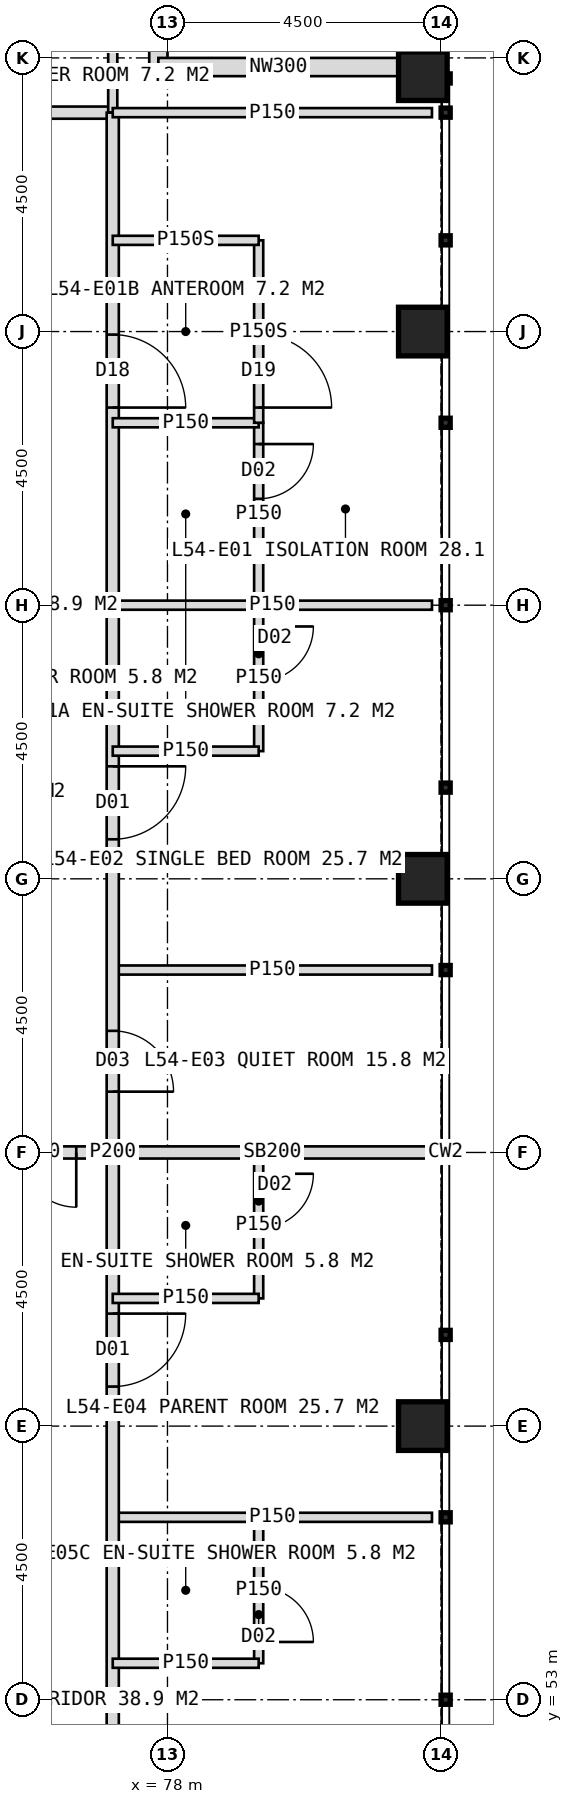
"""IFC4 building model, lengths in metres.
Left out: names, types, materials, properties, quantities, classifications, styles, units other than length and angle.
Written with IfcOpenShell. Run it as: python <this file> out.ifc"""

import sys

from ifc_helpers import new_model, si_unit, direction, frame, frame_2d, origin, origin_2d, place, context, subcontext, project, spatial, rectangle, hollow_rectangle, extrude, element, fill, save


model = new_model("IFC4")
c1 = context("Model", 3, precision=1e-05, world=origin(), true_north=direction((0.0, 1.0)))
c2 = subcontext(c1, "Body", "Model", "MODEL_VIEW")
j1 = project(units=[si_unit("LENGTHUNIT", "METRE"), si_unit("PLANEANGLEUNIT", "RADIAN")], contexts=[c1])
p1 = place(None, origin())
s1 = spatial("IfcSite", under=j1, at=p1, CompositionType="ELEMENT")
p2 = place(p1, origin())
s2 = spatial("IfcBuilding", under=s1, at=p2, CompositionType="ELEMENT")
p3 = place(p2, frame((0.0, 0.0, 225.0)))
s3 = spatial("IfcBuildingStorey", under=s2, at=p3, CompositionType="ELEMENT", Elevation=225.0)
for number, where, z_axis, x_axis in (
    (1, (82.2, 57.5, 0.0), (0.0, 0.0, 1.0), (1.0, 0.0, 0.0)),
    (2, (82.2, 66.5, 0.0), (0.0, 0.0, 1.0), (1.0, 0.0, 0.0)),
    (3, (82.2, 75.5, 0.0), (0.0, 0.0, 1.0), (1.0, 0.0, 0.0)),
    (4, (82.2, 79.7, 0.0), (0.0, 0.0, 1.0), (1.0, 0.0, 0.0)),
):
    element("IfcColumn", number, at=place(p3, frame(where, z_axis=z_axis, x_axis=x_axis)), inside=s3, PredefinedType="COLUMN", context=c2, shape_type="SweptSolid", body=[
        extrude(hollow_rectangle(XDim=0.8, YDim=0.8, WallThickness=0.08, at=origin_2d()), origin(), (0.0, 0.0, 1.0), 4.0),
    ])
for number, where, z_axis, x_axis in (
    (5, (77.85, 83.8, 0.0), (0.0, 0.0, 1.0), (0.0, -1.0, 0.0)),
    (6, (77.85, 79.85, 0.0), (0.0, 0.0, 1.0), (1.0, 0.0, 0.0)),
):
    element("IfcWall", number, at=place(p3, frame(where, z_axis=z_axis, x_axis=x_axis)), inside=s3, PredefinedType="ELEMENTEDWALL", context=c2, shape_type="SweptSolid", body=[
        extrude(rectangle(XDim=3.95, YDim=0.3, at=frame_2d((1.975, 0.0))), origin(), (0.0, 0.0, 1.0), 2.85),
    ])
p4 = place(p3, frame((42.9, 79.1, 0.0), z_axis=(0.0, 0.0, 1.0), x_axis=(1.0, 0.0, 0.0)))
e7 = element("IfcWall", 7, at=p4, inside=s3, PredefinedType="PARTITIONING", context=c2, shape_type="SweptSolid", body=[
    extrude(rectangle(XDim=34.2, YDim=0.2, at=frame_2d((17.1, 0.0))), origin(), (0.0, 0.0, 1.0), 3.75),
])
p5 = place(p4, frame((3.55, 0.0, 0.0)))
e8 = element("IfcOpeningElement", 8, at=p5, cuts=e7, PredefinedType="OPENING", context=c2, shape_type="SweptSolid", body=[
    extrude(rectangle(XDim=1.0, YDim=2.1, at=frame_2d((0.5, 1.05))), frame((0.0, 0.11, 0.0), z_axis=(0.0, -1.0, 0.0), x_axis=(1.0, 0.0, 0.0)), (0.0, 0.0, 1.0), 0.22),
])
p6 = place(p4, frame((10.75, 0.0, 0.0)))
e9 = element("IfcOpeningElement", 9, at=p6, cuts=e7, PredefinedType="OPENING", context=c2, shape_type="SweptSolid", body=[
    extrude(rectangle(XDim=1.2, YDim=2.2, at=frame_2d((0.6, 1.1))), frame((0.0, 0.11, 0.0), z_axis=(0.0, -1.0, 0.0), x_axis=(1.0, 0.0, 0.0)), (0.0, 0.0, 1.0), 0.22),
])
p7 = place(p4, frame((16.25, 0.0, 0.0)))
e10 = element("IfcOpeningElement", 10, at=p7, cuts=e7, PredefinedType="OPENING", context=c2, shape_type="SweptSolid", body=[
    extrude(rectangle(XDim=1.2, YDim=2.2, at=frame_2d((0.6, 1.1))), frame((0.0, 0.11, 0.0), z_axis=(0.0, -1.0, 0.0), x_axis=(1.0, 0.0, 0.0)), (0.0, 0.0, 1.0), 0.22),
])
p8 = place(p4, frame((22.75, 0.0, 0.0)))
e11 = element("IfcOpeningElement", 11, at=p8, cuts=e7, PredefinedType="OPENING", context=c2, shape_type="SweptSolid", body=[
    extrude(rectangle(XDim=1.2, YDim=2.2, at=frame_2d((0.6, 1.1))), frame((0.0, 0.11, 0.0), z_axis=(0.0, -1.0, 0.0), x_axis=(1.0, 0.0, 0.0)), (0.0, 0.0, 1.0), 0.22),
])
p9 = place(p4, frame((29.75, 0.0, 0.0)))
e12 = element("IfcOpeningElement", 12, at=p9, cuts=e7, PredefinedType="OPENING", context=c2, shape_type="SweptSolid", body=[
    extrude(rectangle(XDim=1.2, YDim=2.2, at=frame_2d((0.6, 1.1))), frame((0.0, 0.11, 0.0), z_axis=(0.0, -1.0, 0.0), x_axis=(1.0, 0.0, 0.0)), (0.0, 0.0, 1.0), 0.22),
])
p10 = place(p3, frame((77.1, 79.1, 0.0), z_axis=(0.0, 0.0, 1.0), x_axis=(0.0, 1.0, 0.0)))
e13 = element("IfcWall", 13, at=p10, inside=s3, PredefinedType="PARTITIONING", context=c2, shape_type="SweptSolid", body=[
    extrude(rectangle(XDim=2.4, YDim=0.15, at=frame_2d((1.2, 0.0))), origin(), (0.0, 0.0, 1.0), 3.75),
])
for number, where, z_axis, x_axis in (
    (14, (77.1, 71.0, 0.0), (0.0, 0.0, 1.0), (1.0, 0.0, 0.0)),
    (15, (77.1, 65.0, 0.0), (0.0, 0.0, 1.0), (1.0, 0.0, 0.0)),
):
    element("IfcWall", number, at=place(p3, frame(where, z_axis=z_axis, x_axis=x_axis)), inside=s3, PredefinedType="PARTITIONING", context=c2, shape_type="SweptSolid", body=[
        extrude(rectangle(XDim=5.25, YDim=0.15, at=frame_2d((2.625, 0.0))), origin(), (0.0, 0.0, 1.0), 3.75),
    ])
p11 = place(p3, frame((77.1, 62.0, 0.0), z_axis=(0.0, 0.0, 1.0), x_axis=(1.0, 0.0, 0.0)))
e16 = element("IfcWall", 16, at=p11, inside=s3, PredefinedType="SOLIDWALL", context=c2, shape_type="SweptSolid", body=[
    extrude(rectangle(XDim=5.25, YDim=0.2, at=frame_2d((2.625, 0.0))), origin(), (0.0, 0.0, 1.0), 2.95),
])
p12 = place(p3, frame((77.1, 56.0, 0.0), z_axis=(0.0, 0.0, 1.0), x_axis=(1.0, 0.0, 0.0)))
e17 = element("IfcWall", 17, at=p12, inside=s3, PredefinedType="PARTITIONING", context=c2, shape_type="SweptSolid", body=[
    extrude(rectangle(XDim=5.25, YDim=0.15, at=frame_2d((2.625, 0.0))), origin(), (0.0, 0.0, 1.0), 3.75),
])
p13 = place(p3, frame((77.1, 79.1, 0.0), z_axis=(0.0, 0.0, 1.0), x_axis=(0.0, -1.0, 0.0)))
e18 = element("IfcWall", 18, at=p13, inside=s3, PredefinedType="PARTITIONING", context=c2, shape_type="SweptSolid", body=[
    extrude(rectangle(XDim=34.2, YDim=0.2, at=frame_2d((17.1, 0.0))), origin(), (0.0, 0.0, 1.0), 3.75),
])
p14 = place(p13, frame((3.65, 0.0, 0.0)))
e19 = element("IfcOpeningElement", 19, at=p14, cuts=e18, PredefinedType="OPENING", context=c2, shape_type="SweptSolid", body=[
    extrude(rectangle(XDim=1.2, YDim=2.2, at=frame_2d((0.6, 1.1))), frame((0.0, 0.11, 0.0), z_axis=(0.0, -1.0, 0.0), x_axis=(1.0, 0.0, 0.0)), (0.0, 0.0, 1.0), 0.22),
])
p15 = place(p13, frame((10.75, 0.0, 0.0)))
e20 = element("IfcOpeningElement", 20, at=p15, cuts=e18, PredefinedType="OPENING", context=c2, shape_type="SweptSolid", body=[
    extrude(rectangle(XDim=1.2, YDim=2.2, at=frame_2d((0.6, 1.1))), frame((0.0, 0.11, 0.0), z_axis=(0.0, -1.0, 0.0), x_axis=(1.0, 0.0, 0.0)), (0.0, 0.0, 1.0), 0.22),
])
p16 = place(p13, frame((15.1, 0.0, 0.0)))
e21 = element("IfcOpeningElement", 21, at=p16, cuts=e18, PredefinedType="OPENING", context=c2, shape_type="SweptSolid", body=[
    extrude(rectangle(XDim=1.0, YDim=2.1, at=frame_2d((0.5, 1.05))), frame((0.0, 0.11, 0.0), z_axis=(0.0, -1.0, 0.0), x_axis=(1.0, 0.0, 0.0)), (0.0, 0.0, 1.0), 0.22),
])
p17 = place(p13, frame((19.75, 0.0, 0.0)))
e22 = element("IfcOpeningElement", 22, at=p17, cuts=e18, PredefinedType="OPENING", context=c2, shape_type="SweptSolid", body=[
    extrude(rectangle(XDim=1.2, YDim=2.2, at=frame_2d((0.6, 1.1))), frame((0.0, 0.11, 0.0), z_axis=(0.0, -1.0, 0.0), x_axis=(1.0, 0.0, 0.0)), (0.0, 0.0, 1.0), 0.22),
])
p18 = place(p13, frame((30.35, 0.0, 0.0)))
e23 = element("IfcOpeningElement", 23, at=p18, cuts=e18, PredefinedType="OPENING", context=c2, shape_type="SweptSolid", body=[
    extrude(rectangle(XDim=1.2, YDim=2.2, at=frame_2d((0.6, 1.1))), frame((0.0, 0.11, 0.0), z_axis=(0.0, -1.0, 0.0), x_axis=(1.0, 0.0, 0.0)), (0.0, 0.0, 1.0), 0.22),
])
p19 = place(p3, frame((77.1, 79.1, 0.0), z_axis=(0.0, 0.0, 1.0), x_axis=(1.0, 0.0, 0.0)))
e24 = element("IfcWall", 24, at=p19, inside=s3, PredefinedType="PARTITIONING", context=c2, shape_type="SweptSolid", body=[
    extrude(rectangle(XDim=5.25, YDim=0.15, at=frame_2d((2.625, 0.0))), origin(), (0.0, 0.0, 1.0), 3.75),
])
p20 = place(p3, frame((79.5, 74.0, 0.0), z_axis=(0.0, 0.0, 1.0), x_axis=(0.0, -1.0, 0.0)))
e25 = element("IfcWall", 25, at=p20, inside=s3, PredefinedType="PARTITIONING", context=c2, shape_type="SweptSolid", body=[
    extrude(rectangle(XDim=3.0, YDim=0.15, at=frame_2d((1.5, 0.0))), origin(), (0.0, 0.0, 1.0), 3.75),
])
p21 = place(p20, frame((0.35, 0.0, 0.0)))
e26 = element("IfcOpeningElement", 26, at=p21, cuts=e25, PredefinedType="OPENING", context=c2, shape_type="SweptSolid", body=[
    extrude(rectangle(XDim=0.9, YDim=2.1, at=frame_2d((0.45, 1.05))), frame((0.0, 0.085, 0.0), z_axis=(0.0, -1.0, 0.0), x_axis=(1.0, 0.0, 0.0)), (0.0, 0.0, 1.0), 0.17),
])
p22 = place(p3, frame((77.1, 74.0, 0.0), z_axis=(0.0, 0.0, 1.0), x_axis=(1.0, 0.0, 0.0)))
e27 = element("IfcWall", 27, at=p22, inside=s3, PredefinedType="PARTITIONING", context=c2, shape_type="SweptSolid", body=[
    extrude(rectangle(XDim=2.4, YDim=0.15, at=frame_2d((1.2, 0.0))), origin(), (0.0, 0.0, 1.0), 3.75),
])
p23 = place(p3, frame((79.5, 77.0, 0.0), z_axis=(0.0, 0.0, 1.0), x_axis=(0.0, -1.0, 0.0)))
e28 = element("IfcWall", 28, at=p23, inside=s3, PredefinedType="PARTITIONING", context=c2, shape_type="SweptSolid", body=[
    extrude(rectangle(XDim=3.0, YDim=0.15, at=frame_2d((1.5, 0.0))), origin(), (0.0, 0.0, 1.0), 3.75),
])
p24 = place(p23, frame((1.55, 0.0, 0.0)))
e29 = element("IfcOpeningElement", 29, at=p24, cuts=e28, PredefinedType="OPENING", context=c2, shape_type="SweptSolid", body=[
    extrude(rectangle(XDim=1.2, YDim=2.2, at=frame_2d((0.6, 1.1))), frame((0.0, 0.085, 0.0), z_axis=(0.0, -1.0, 0.0), x_axis=(1.0, 0.0, 0.0)), (0.0, 0.0, 1.0), 0.17),
])
p25 = place(p3, frame((77.1, 77.0, 0.0), z_axis=(0.0, 0.0, 1.0), x_axis=(1.0, 0.0, 0.0)))
e30 = element("IfcWall", 30, at=p25, inside=s3, PredefinedType="PARTITIONING", context=c2, shape_type="SweptSolid", body=[
    extrude(rectangle(XDim=2.4, YDim=0.15, at=frame_2d((1.2, 0.0))), origin(), (0.0, 0.0, 1.0), 3.75),
])
p26 = place(p3, frame((79.5, 71.0, 0.0), z_axis=(0.0, 0.0, 1.0), x_axis=(0.0, -1.0, 0.0)))
e31 = element("IfcWall", 31, at=p26, inside=s3, PredefinedType="PARTITIONING", context=c2, shape_type="SweptSolid", body=[
    extrude(rectangle(XDim=2.4, YDim=0.15, at=frame_2d((1.2, 0.0))), origin(), (0.0, 0.0, 1.0), 3.75),
])
p27 = place(p26, frame((0.35, 0.0, 0.0)))
e32 = element("IfcOpeningElement", 32, at=p27, cuts=e31, PredefinedType="OPENING", context=c2, shape_type="SweptSolid", body=[
    extrude(rectangle(XDim=0.9, YDim=2.1, at=frame_2d((0.45, 1.05))), frame((0.0, 0.085, 0.0), z_axis=(0.0, -1.0, 0.0), x_axis=(1.0, 0.0, 0.0)), (0.0, 0.0, 1.0), 0.17),
])
p28 = place(p3, frame((77.1, 68.6, 0.0), z_axis=(0.0, 0.0, 1.0), x_axis=(1.0, 0.0, 0.0)))
e33 = element("IfcWall", 33, at=p28, inside=s3, PredefinedType="PARTITIONING", context=c2, shape_type="SweptSolid", body=[
    extrude(rectangle(XDim=2.4, YDim=0.15, at=frame_2d((1.2, 0.0))), origin(), (0.0, 0.0, 1.0), 3.75),
])
p29 = place(p3, frame((79.5, 62.0, 0.0), z_axis=(0.0, 0.0, 1.0), x_axis=(0.0, -1.0, 0.0)))
e34 = element("IfcWall", 34, at=p29, inside=s3, PredefinedType="PARTITIONING", context=c2, shape_type="SweptSolid", body=[
    extrude(rectangle(XDim=2.4, YDim=0.15, at=frame_2d((1.2, 0.0))), origin(), (0.0, 0.0, 1.0), 3.75),
])
p30 = place(p29, frame((0.35, 0.0, 0.0)))
e35 = element("IfcOpeningElement", 35, at=p30, cuts=e34, PredefinedType="OPENING", context=c2, shape_type="SweptSolid", body=[
    extrude(rectangle(XDim=0.9, YDim=2.1, at=frame_2d((0.45, 1.05))), frame((0.0, 0.085, 0.0), z_axis=(0.0, -1.0, 0.0), x_axis=(1.0, 0.0, 0.0)), (0.0, 0.0, 1.0), 0.17),
])
p31 = place(p3, frame((77.1, 59.6, 0.0), z_axis=(0.0, 0.0, 1.0), x_axis=(1.0, 0.0, 0.0)))
e36 = element("IfcWall", 36, at=p31, inside=s3, PredefinedType="PARTITIONING", context=c2, shape_type="SweptSolid", body=[
    extrude(rectangle(XDim=2.4, YDim=0.15, at=frame_2d((1.2, 0.0))), origin(), (0.0, 0.0, 1.0), 3.75),
])
p32 = place(p3, frame((79.5, 56.0, 0.0), z_axis=(0.0, 0.0, 1.0), x_axis=(0.0, -1.0, 0.0)))
e37 = element("IfcWall", 37, at=p32, inside=s3, PredefinedType="PARTITIONING", context=c2, shape_type="SweptSolid", body=[
    extrude(rectangle(XDim=2.4, YDim=0.15, at=frame_2d((1.2, 0.0))), origin(), (0.0, 0.0, 1.0), 3.75),
])
p33 = place(p32, frame((1.15, 0.0, 0.0)))
e38 = element("IfcOpeningElement", 38, at=p33, cuts=e37, PredefinedType="OPENING", context=c2, shape_type="SweptSolid", body=[
    extrude(rectangle(XDim=0.9, YDim=2.1, at=frame_2d((0.45, 1.05))), frame((0.0, 0.085, 0.0), z_axis=(0.0, -1.0, 0.0), x_axis=(1.0, 0.0, 0.0)), (0.0, 0.0, 1.0), 0.17),
])
p34 = place(p3, frame((77.1, 53.6, 0.0), z_axis=(0.0, 0.0, 1.0), x_axis=(1.0, 0.0, 0.0)))
e39 = element("IfcWall", 39, at=p34, inside=s3, PredefinedType="PARTITIONING", context=c2, shape_type="SweptSolid", body=[
    extrude(rectangle(XDim=2.4, YDim=0.15, at=frame_2d((1.2, 0.0))), origin(), (0.0, 0.0, 1.0), 3.75),
])
p35 = place(p3, frame((74.4, 62.0, 0.0), z_axis=(0.0, 0.0, 1.0), x_axis=(1.0, 0.0, 0.0)))
e40 = element("IfcWall", 40, at=p35, inside=s3, PredefinedType="SOLIDWALL", context=c2, shape_type="SweptSolid", body=[
    extrude(rectangle(XDim=2.7, YDim=0.2, at=frame_2d((1.35, 0.0))), origin(), (0.0, 0.0, 1.0), 2.95),
])
p36 = place(p35, frame((0.3, 0.0, 0.0)))
e41 = element("IfcOpeningElement", 41, at=p36, cuts=e40, PredefinedType="OPENING", context=c2, shape_type="SweptSolid", body=[
    extrude(rectangle(XDim=1.8, YDim=2.2, at=frame_2d((0.9, 1.1))), frame((0.0, 0.11, 0.0), z_axis=(0.0, -1.0, 0.0), x_axis=(1.0, 0.0, 0.0)), (0.0, 0.0, 1.0), 0.22),
])
p37 = place(p24, origin())
e42 = element("IfcDoor", 42, at=p37, inside=s3, OperationType="SINGLE_SWING_RIGHT", PredefinedType="DOOR", context=c2, shape_type="SweptSolid", body=[
    extrude(rectangle(XDim=1.2, YDim=2.2, at=frame_2d((0.6, 1.1))), frame((0.0, 0.025, 0.0), z_axis=(0.0, -1.0, 0.0), x_axis=(1.0, 0.0, 0.0)), (0.0, 0.0, 1.0), 0.05),
])
fill(e29, e42)
p38 = place(p14, origin())
e43 = element("IfcDoor", 43, at=p38, inside=s3, OperationType="SINGLE_SWING_RIGHT", PredefinedType="DOOR", context=c2, shape_type="SweptSolid", body=[
    extrude(rectangle(XDim=1.2, YDim=2.2, at=frame_2d((0.6, 1.1))), frame((0.0, 0.025, 0.0), z_axis=(0.0, -1.0, 0.0), x_axis=(1.0, 0.0, 0.0)), (0.0, 0.0, 1.0), 0.05),
])
fill(e19, e43)
p39 = place(p21, origin())
e44 = element("IfcDoor", 44, at=p39, inside=s3, OperationType="SINGLE_SWING_LEFT", PredefinedType="DOOR", context=c2, shape_type="SweptSolid", body=[
    extrude(rectangle(XDim=0.9, YDim=2.1, at=frame_2d((0.45, 1.05))), frame((0.0, 0.025, 0.0), z_axis=(0.0, -1.0, 0.0), x_axis=(1.0, 0.0, 0.0)), (0.0, 0.0, 1.0), 0.05),
])
fill(e26, e44)
p40 = place(p15, origin())
e45 = element("IfcDoor", 45, at=p40, inside=s3, OperationType="SINGLE_SWING_LEFT", PredefinedType="DOOR", context=c2, shape_type="SweptSolid", body=[
    extrude(rectangle(XDim=1.2, YDim=2.2, at=frame_2d((0.6, 1.1))), frame((0.0, 0.025, 0.0), z_axis=(0.0, -1.0, 0.0), x_axis=(1.0, 0.0, 0.0)), (0.0, 0.0, 1.0), 0.05),
])
fill(e20, e45)
p41 = place(p27, origin())
e46 = element("IfcDoor", 46, at=p41, inside=s3, OperationType="SINGLE_SWING_LEFT", PredefinedType="DOOR", context=c2, shape_type="SweptSolid", body=[
    extrude(rectangle(XDim=0.9, YDim=2.1, at=frame_2d((0.45, 1.05))), frame((0.0, 0.025, 0.0), z_axis=(0.0, -1.0, 0.0), x_axis=(1.0, 0.0, 0.0)), (0.0, 0.0, 1.0), 0.05),
])
fill(e32, e46)
p42 = place(p16, origin())
e47 = element("IfcDoor", 47, at=p42, inside=s3, OperationType="SINGLE_SWING_RIGHT", PredefinedType="DOOR", context=c2, shape_type="SweptSolid", body=[
    extrude(rectangle(XDim=1.0, YDim=2.1, at=frame_2d((0.5, 1.05))), frame((0.0, 0.025, 0.0), z_axis=(0.0, -1.0, 0.0), x_axis=(1.0, 0.0, 0.0)), (0.0, 0.0, 1.0), 0.05),
])
fill(e21, e47)
p43 = place(p17, origin())
e48 = element("IfcDoor", 48, at=p43, inside=s3, OperationType="SINGLE_SWING_LEFT", PredefinedType="DOOR", context=c2, shape_type="SweptSolid", body=[
    extrude(rectangle(XDim=1.2, YDim=2.2, at=frame_2d((0.6, 1.1))), frame((0.0, 0.025, 0.0), z_axis=(0.0, -1.0, 0.0), x_axis=(1.0, 0.0, 0.0)), (0.0, 0.0, 1.0), 0.05),
])
fill(e22, e48)
p44 = place(p30, origin())
e49 = element("IfcDoor", 49, at=p44, inside=s3, OperationType="SINGLE_SWING_LEFT", PredefinedType="DOOR", context=c2, shape_type="SweptSolid", body=[
    extrude(rectangle(XDim=0.9, YDim=2.1, at=frame_2d((0.45, 1.05))), frame((0.0, 0.025, 0.0), z_axis=(0.0, -1.0, 0.0), x_axis=(1.0, 0.0, 0.0)), (0.0, 0.0, 1.0), 0.05),
])
fill(e35, e49)
p45 = place(p33, origin())
e50 = element("IfcDoor", 50, at=p45, inside=s3, OperationType="SINGLE_SWING_RIGHT", PredefinedType="DOOR", context=c2, shape_type="SweptSolid", body=[
    extrude(rectangle(XDim=0.9, YDim=2.1, at=frame_2d((0.45, 1.05))), frame((0.0, 0.025, 0.0), z_axis=(0.0, -1.0, 0.0), x_axis=(1.0, 0.0, 0.0)), (0.0, 0.0, 1.0), 0.05),
])
fill(e38, e50)
p46 = place(p36, origin())
e51 = element("IfcDoor", 51, at=p46, inside=s3, OperationType="DOUBLE_DOOR_DOUBLE_SWING", PredefinedType="DOOR", context=c2, shape_type="SweptSolid", body=[
    extrude(rectangle(XDim=1.8, YDim=2.2, at=frame_2d((0.9, 1.1))), frame((0.0, 0.025, 0.0), z_axis=(0.0, -1.0, 0.0), x_axis=(1.0, 0.0, 0.0)), (0.0, 0.0, 1.0), 0.05),
])
fill(e41, e51)
save(model, sys.argv[1])
